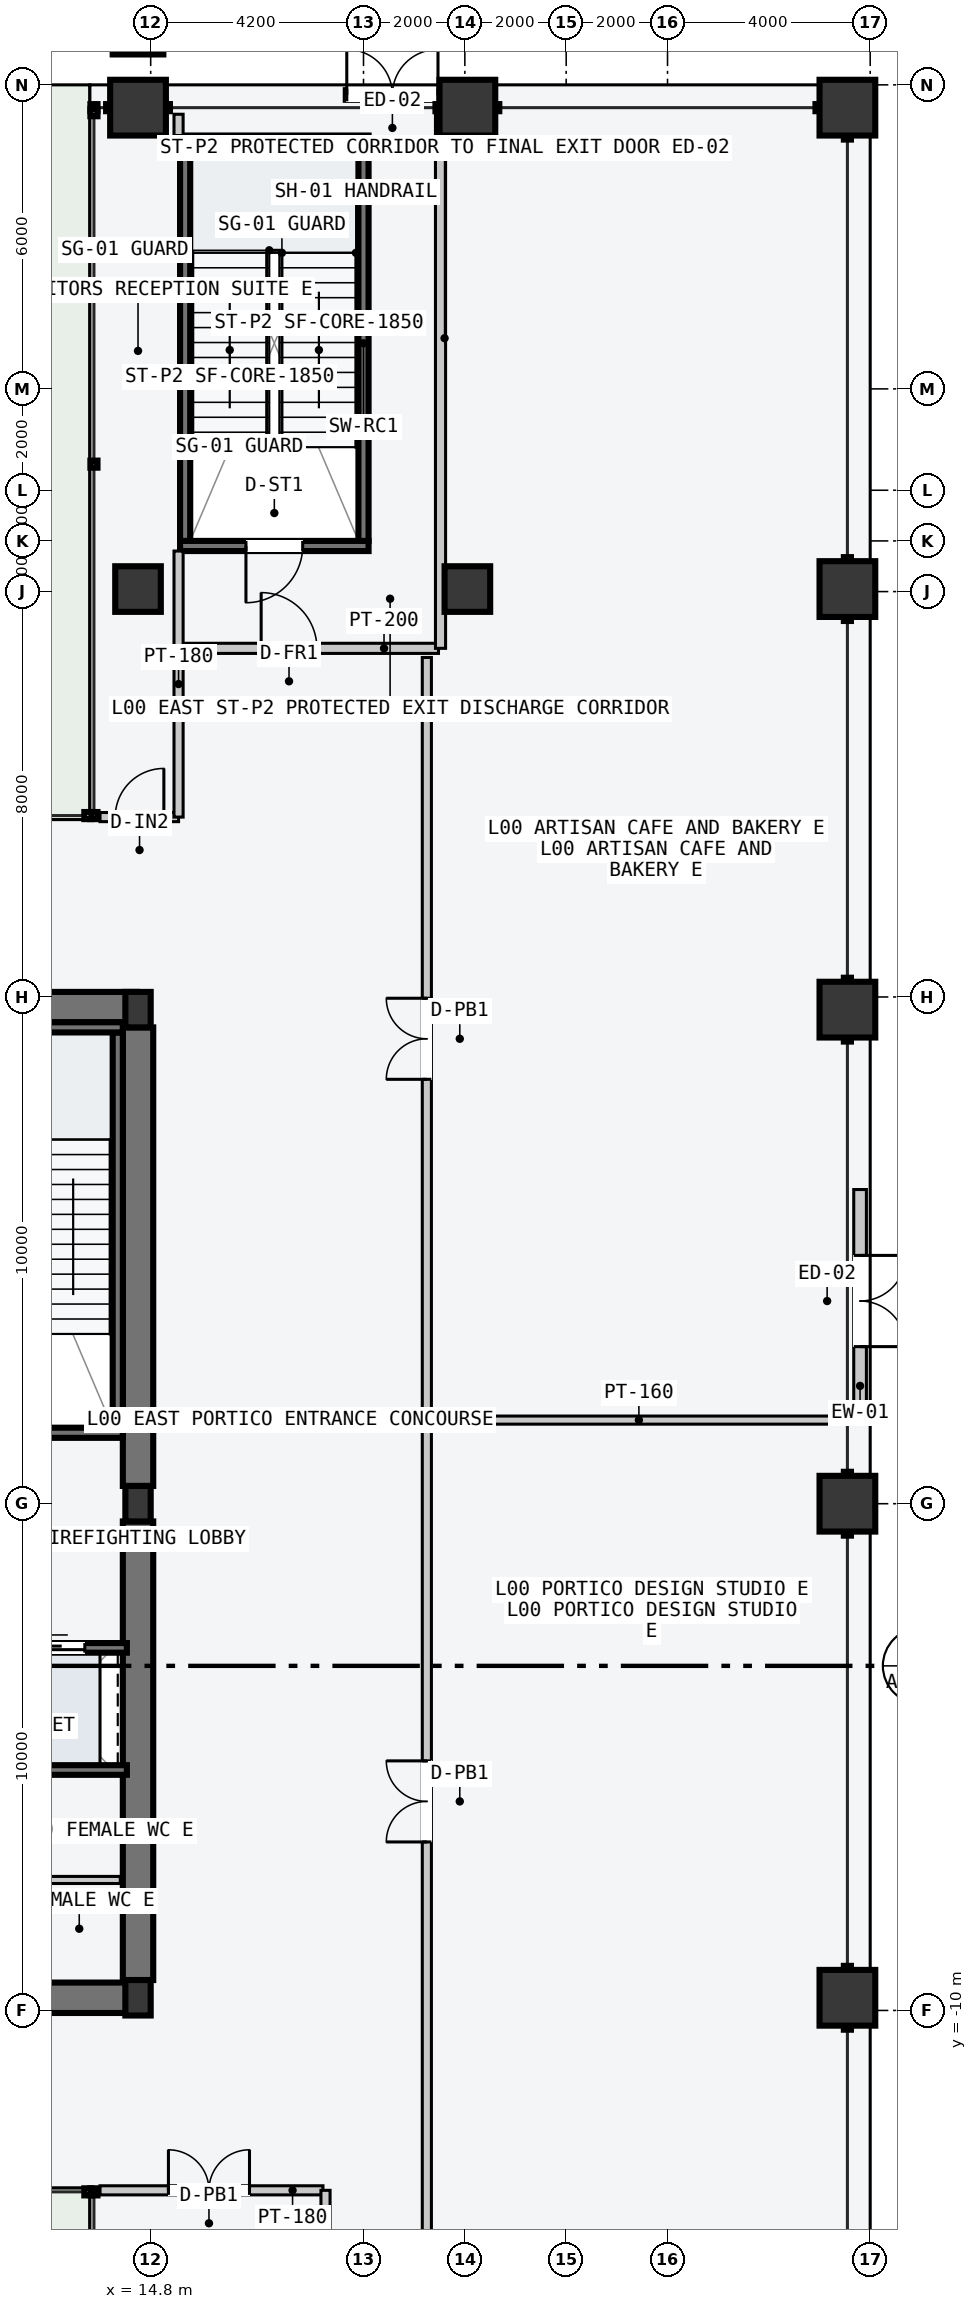
"""IFC4 building model, lengths in metres.
Left out: names, types, materials, properties, quantities, classifications, styles, units other than length and angle.
Written with IfcOpenShell. Run it as: python <this file> out.ifc"""

import sys

from ifc_helpers import new_model, si_unit, direction, frame, frame_2d, origin, origin_2d, place, context, subcontext, project, spatial, rectangle, hollow_rectangle, i_section, extrude, element, fill, save


model = new_model("IFC4")
c1 = context("Model", 3, precision=1e-05, world=origin(), true_north=direction((0.0, 1.0)))
c2 = subcontext(c1, "Body", "Model", "MODEL_VIEW")
j1 = project(units=[si_unit("LENGTHUNIT", "METRE"), si_unit("PLANEANGLEUNIT", "RADIAN")], contexts=[c1])
p1 = place(None, origin())
s1 = spatial("IfcSite", under=j1, at=p1, CompositionType="ELEMENT")
p2 = place(p1, origin())
s2 = spatial("IfcBuilding", under=s1, at=p2, CompositionType="ELEMENT")
p3 = place(p2, origin())
s3 = spatial("IfcBuildingStorey", under=s2, at=p3, CompositionType="ELEMENT", Elevation=0.0)
for number, where, z_axis, x_axis in (
    (1, (8.07, -9.75, -0.22), (0.0, 0.0, 1.0), (1.0, 0.0, 0.0)),
    (2, (8.07, 9.8, -0.22), (0.0, 0.0, 1.0), (1.0, 0.0, 0.0)),
):
    element("IfcWall", number, at=place(p3, frame(where, z_axis=z_axis, x_axis=x_axis)), inside=s3, PredefinedType="SHEAR", context=c2, shape_type="SweptSolid", body=[
        extrude(rectangle(XDim=6.46, YDim=0.6, at=frame_2d((3.23, 0.0))), origin(), (0.0, 0.0, 1.0), 4.8),
    ])
for number, where, z_axis, x_axis in (
    (3, (14.55, -9.4, -0.22), (0.0, 0.0, 1.0), (0.0, 1.0, 0.0)),
    (4, (14.55, 0.35, -0.22), (0.0, 0.0, 1.0), (0.0, 1.0, 0.0)),
):
    element("IfcWall", number, at=place(p3, frame(where, z_axis=z_axis, x_axis=x_axis)), inside=s3, PredefinedType="SHEAR", context=c2, shape_type="SweptSolid", body=[
        extrude(rectangle(XDim=9.05, YDim=0.6, at=frame_2d((4.525, 0.0))), origin(), (0.0, 0.0, 1.0), 4.8),
    ])
p4 = place(p3, frame((14.15, 1.5, -0.22), z_axis=(0.0, 0.0, 1.0), x_axis=(0.0, 1.0, 0.0)))
e5 = element("IfcWall", 5, at=p4, inside=s3, PredefinedType="SOLIDWALL", context=c2, shape_type="SweptSolid", body=[
    extrude(rectangle(XDim=7.8, YDim=0.2, at=frame_2d((3.9, 0.0))), origin(), (0.0, 0.0, 1.0), 4.8),
])
p5 = place(p3, frame((14.25, 1.4, -0.22), z_axis=(0.0, 0.0, 1.0), x_axis=(-1.0, 0.0, 0.0)))
e6 = element("IfcWall", 6, at=p5, inside=s3, PredefinedType="SOLIDWALL", context=c2, shape_type="SweptSolid", body=[
    extrude(rectangle(XDim=4.1, YDim=0.2, at=frame_2d((2.05, 0.0))), origin(), (0.0, 0.0, 1.0), 4.8),
])
p6 = place(p5, frame((1.5, 0.0, 0.22)))
e7 = element("IfcOpeningElement", 7, at=p6, cuts=e6, PredefinedType="OPENING", context=c2, shape_type="SweptSolid", body=[
    extrude(rectangle(XDim=1.12, YDim=2.18, at=frame_2d((0.56, 1.09))), frame((0.0, 0.11, 0.0), z_axis=(0.0, -1.0, 0.0), x_axis=(1.0, 0.0, 0.0)), (0.0, 0.0, 1.0), 0.22),
])
p7 = place(p3, frame((10.15, 9.4, -0.22), z_axis=(0.0, 0.0, 1.0), x_axis=(1.0, 0.0, 0.0)))
e8 = element("IfcWall", 8, at=p7, inside=s3, PredefinedType="SOLIDWALL", context=c2, shape_type="SweptSolid", body=[
    extrude(rectangle(XDim=4.1, YDim=0.2, at=frame_2d((2.05, 0.0))), origin(), (0.0, 0.0, 1.0), 4.8),
])
p8 = place(p3, frame((19.1, 18.9, -0.22), z_axis=(0.0, 0.0, 1.0), x_axis=(-1.0, 0.0, 0.0)))
e9 = element("IfcWall", 9, at=p8, inside=s3, PredefinedType="SOLIDWALL", context=c2, shape_type="SweptSolid", body=[
    extrude(rectangle(XDim=3.72, YDim=0.2, at=frame_2d((1.86, 0.0))), origin(), (0.0, 0.0, 1.0), 4.8),
])
p9 = place(p8, frame((1.3, 0.0, 0.22)))
e10 = element("IfcOpeningElement", 10, at=p9, cuts=e9, PredefinedType="OPENING", context=c2, shape_type="SweptSolid", body=[
    extrude(rectangle(XDim=1.12, YDim=2.18, at=frame_2d((0.56, 1.09))), frame((0.0, 0.11, 0.0), z_axis=(0.0, -1.0, 0.0), x_axis=(1.0, 0.0, 0.0)), (0.0, 0.0, 1.0), 0.22),
])
p10 = place(p3, frame((15.38, 26.9, -0.22), z_axis=(0.0, 0.0, 1.0), x_axis=(1.0, 0.0, 0.0)))
e11 = element("IfcWall", 11, at=p10, inside=s3, PredefinedType="SOLIDWALL", context=c2, shape_type="SweptSolid", body=[
    extrude(rectangle(XDim=3.72, YDim=0.2, at=frame_2d((1.86, 0.0))), origin(), (0.0, 0.0, 1.0), 4.8),
])
for number, where, z_axis, x_axis in (
    (12, (15.48, 19.0, -0.22), (0.0, 0.0, 1.0), (0.0, 1.0, 0.0)),
    (13, (19.0, 19.0, -0.22), (0.0, 0.0, 1.0), (0.0, 1.0, 0.0)),
):
    element("IfcWall", number, at=place(p3, frame(where, z_axis=z_axis, x_axis=x_axis)), inside=s3, PredefinedType="SOLIDWALL", context=c2, shape_type="SweptSolid", body=[
        extrude(rectangle(XDim=7.8, YDim=0.2, at=frame_2d((3.9, 0.0))), origin(), (0.0, 0.0, 1.0), 4.8),
    ])
for number, where, z_axis, x_axis in (
    (14, (14.55, -9.75, 0.0), (0.0, 0.0, 1.0), (1.0, 0.0, 0.0)),
    (15, (14.55, 0.0, 0.0), (0.0, 0.0, 1.0), (1.0, 0.0, 0.0)),
    (16, (14.55, 9.75, 0.0), (0.0, 0.0, 1.0), (1.0, 0.0, 0.0)),
):
    element("IfcColumn", number, at=place(p3, frame(where, z_axis=z_axis, x_axis=x_axis)), inside=s3, PredefinedType="COLUMN", context=c2, shape_type="SweptSolid", body=[
        extrude(i_section(OverallWidth=0.5, OverallDepth=0.7, WebThickness=0.028, FlangeThickness=0.045, at=origin_2d()), origin(), (0.0, 0.0, 1.0), 4.8),
    ])
for number, where, z_axis, x_axis in (
    (17, (14.55, 18.05, 0.0), (0.0, 0.0, 1.0), (1.0, 0.0, 0.0)),
    (18, (21.05, 18.05, 0.0), (0.0, 0.0, 1.0), (1.0, 0.0, 0.0)),
):
    element("IfcColumn", number, at=place(p3, frame(where, z_axis=z_axis, x_axis=x_axis)), inside=s3, PredefinedType="COLUMN", context=c2, shape_type="SweptSolid", body=[
        extrude(hollow_rectangle(XDim=0.9, YDim=0.9, WallThickness=0.045, at=origin_2d()), origin(), (0.0, 0.0, 1.0), 4.8),
    ])
for number, where, z_axis, x_axis in (
    (19, (14.55, 27.55, 0.0), (0.0, 0.0, 1.0), (1.0, 0.0, 0.0)),
    (20, (21.05, 27.55, 0.0), (0.0, 0.0, 1.0), (1.0, 0.0, 0.0)),
    (21, (28.55, 27.55, 0.0), (0.0, 0.0, 1.0), (1.0, 0.0, 0.0)),
    (22, (28.55, -9.75, 0.0), (0.0, 0.0, 1.0), (0.0, 1.0, 0.0)),
    (23, (28.55, 0.0, 0.0), (0.0, 0.0, 1.0), (0.0, 1.0, 0.0)),
    (24, (28.55, 9.75, 0.0), (0.0, 0.0, 1.0), (0.0, 1.0, 0.0)),
    (25, (28.55, 18.05, 0.0), (0.0, 0.0, 1.0), (0.0, 1.0, 0.0)),
):
    element("IfcColumn", number, at=place(p3, frame(where, z_axis=z_axis, x_axis=x_axis)), inside=s3, PredefinedType="COLUMN", context=c2, shape_type="SweptSolid", body=[
        extrude(hollow_rectangle(XDim=1.1, YDim=1.1, WallThickness=0.055, at=origin_2d()), origin(), (0.0, 0.0, 1.0), 4.8),
    ])
p11 = place(p3, frame((14.55, 29.1, -0.22), z_axis=(0.0, 0.0, 1.0), x_axis=(1.0, 0.0, 0.0)))
e26 = element("IfcColumn", 26, at=p11, inside=s3, PredefinedType="COLUMN", context=c2, shape_type="SweptSolid", body=[
    extrude(hollow_rectangle(XDim=1.0, YDim=1.0, WallThickness=0.05, at=origin_2d()), origin(), (0.0, 0.0, 1.0), 5.02),
])
p12 = place(p3, frame((11.65, -2.845, -0.22), z_axis=(0.0, 0.0, 1.0), x_axis=(1.0, 0.0, 0.0)))
e27 = element("IfcWall", 27, at=p12, inside=s3, PredefinedType="SOLIDWALL", context=c2, shape_type="SweptSolid", body=[
    extrude(rectangle(XDim=2.68, YDim=0.19, at=frame_2d((1.34, 0.0))), origin(), (0.0, 0.0, 1.0), 4.8),
])
p13 = place(p12, frame((0.65, 0.0, 0.22)))
e28 = element("IfcOpeningElement", 28, at=p13, cuts=e27, PredefinedType="OPENING", context=c2, shape_type="SweptSolid", body=[
    extrude(rectangle(XDim=1.2, YDim=2.2, at=frame_2d((0.6, 1.1))), frame((0.0, 0.105, 0.0), z_axis=(0.0, -1.0, 0.0), x_axis=(1.0, 0.0, 0.0)), (0.0, 0.0, 1.0), 0.21),
])
p14 = place(p3, frame((11.65, -5.255, -0.22), z_axis=(0.0, 0.0, 1.0), x_axis=(1.0, 0.0, 0.0)))
e29 = element("IfcWall", 29, at=p14, inside=s3, PredefinedType="SOLIDWALL", context=c2, shape_type="SweptSolid", body=[
    extrude(rectangle(XDim=2.68, YDim=0.19, at=frame_2d((1.34, 0.0))), origin(), (0.0, 0.0, 1.0), 4.8),
])
p15 = place(p3, frame((11.7, -7.425, 0.0), z_axis=(0.0, 0.0, 1.0), x_axis=(1.0, 0.0, 0.0)))
e30 = element("IfcWall", 30, at=p15, inside=s3, PredefinedType="PARTITIONING", context=c2, shape_type="SweptSolid", body=[
    extrude(rectangle(XDim=2.5, YDim=0.14, at=frame_2d((1.25, 0.0))), origin(), (0.0, 0.0, 1.0), 4.58),
])
p16 = place(p3, frame((15.38, 16.88, 0.0), z_axis=(0.0, 0.0, 1.0), x_axis=(1.0, 0.0, 0.0)))
e31 = element("IfcWall", 31, at=p16, inside=s3, PredefinedType="PARTITIONING", context=c2, shape_type="SweptSolid", body=[
    extrude(rectangle(XDim=5.1, YDim=0.2, at=frame_2d((2.55, 0.0))), origin(), (0.0, 0.0, 1.0), 4.58),
])
p17 = place(p16, frame((1.6, 0.0, 0.0)))
e32 = element("IfcOpeningElement", 32, at=p17, cuts=e31, PredefinedType="OPENING", context=c2, shape_type="SweptSolid", body=[
    extrude(rectangle(XDim=1.1, YDim=2.15, at=frame_2d((0.55, 1.075))), frame((0.0, 0.11, 0.0), z_axis=(0.0, -1.0, 0.0), x_axis=(1.0, 0.0, 0.0)), (0.0, 0.0, 1.0), 0.22),
])
p18 = place(p3, frame((20.52, 16.88, 0.0), z_axis=(0.0, 0.0, 1.0), x_axis=(0.0, 1.0, 0.0)))
e33 = element("IfcWall", 33, at=p18, inside=s3, PredefinedType="PARTITIONING", context=c2, shape_type="SweptSolid", body=[
    extrude(rectangle(XDim=10.77, YDim=0.2, at=frame_2d((5.385, 0.0))), origin(), (0.0, 0.0, 1.0), 4.58),
])
p19 = place(p3, frame((20.35, 1.65, 0.0), z_axis=(0.0, 0.0, 1.0), x_axis=(1.0, 0.0, 0.0)))
e34 = element("IfcWall", 34, at=p19, inside=s3, PredefinedType="PARTITIONING", context=c2, shape_type="SweptSolid", body=[
    extrude(rectangle(XDim=8.17, YDim=0.16, at=frame_2d((4.085, 0.0))), origin(), (0.0, 0.0, 1.0), 4.58),
])
p20 = place(p3, frame((20.25, -20.6, 0.0), z_axis=(0.0, 0.0, 1.0), x_axis=(0.0, 1.0, 0.0)))
e35 = element("IfcWall", 35, at=p20, inside=s3, PredefinedType="PARTITIONING", context=c2, shape_type="SweptSolid", body=[
    extrude(rectangle(XDim=37.3, YDim=0.18, at=frame_2d((18.65, 0.0))), origin(), (0.0, 0.0, 1.0), 4.58),
])
p21 = place(p20, frame((13.925, 0.0, 0.0)))
e36 = element("IfcOpeningElement", 36, at=p21, cuts=e35, PredefinedType="OPENING", context=c2, shape_type="SweptSolid", body=[
    extrude(rectangle(XDim=1.6, YDim=2.3, at=frame_2d((0.8, 1.15))), frame((0.0, 0.1, 0.0), z_axis=(0.0, -1.0, 0.0), x_axis=(1.0, 0.0, 0.0)), (0.0, 0.0, 1.0), 0.2),
])
p22 = place(p20, frame((28.975, 0.0, 0.0)))
e37 = element("IfcOpeningElement", 37, at=p22, cuts=e35, PredefinedType="OPENING", context=c2, shape_type="SweptSolid", body=[
    extrude(rectangle(XDim=1.6, YDim=2.3, at=frame_2d((0.8, 1.15))), frame((0.0, 0.1, 0.0), z_axis=(0.0, -1.0, 0.0), x_axis=(1.0, 0.0, 0.0)), (0.0, 0.0, 1.0), 0.2),
])
p23 = place(p3, frame((13.8, -13.55, 0.0), z_axis=(0.0, 0.0, 1.0), x_axis=(1.0, 0.0, 0.0)))
e38 = element("IfcWall", 38, at=p23, inside=s3, PredefinedType="PARTITIONING", context=c2, shape_type="SweptSolid", body=[
    extrude(rectangle(XDim=4.4, YDim=0.18, at=frame_2d((2.2, 0.0))), origin(), (0.0, 0.0, 1.0), 4.58),
])
p24 = place(p23, frame((1.35, 0.0, 0.0)))
e39 = element("IfcOpeningElement", 39, at=p24, cuts=e38, PredefinedType="OPENING", context=c2, shape_type="SweptSolid", body=[
    extrude(rectangle(XDim=1.6, YDim=2.3, at=frame_2d((0.8, 1.15))), frame((0.0, 0.1, 0.0), z_axis=(0.0, -1.0, 0.0), x_axis=(1.0, 0.0, 0.0)), (0.0, 0.0, 1.0), 0.2),
])
p25 = place(p3, frame((18.25, -27.5, 0.0), z_axis=(0.0, 0.0, 1.0), x_axis=(0.0, 1.0, 0.0)))
e40 = element("IfcWall", 40, at=p25, inside=s3, PredefinedType="PARTITIONING", context=c2, shape_type="SweptSolid", body=[
    extrude(rectangle(XDim=13.95, YDim=0.18, at=frame_2d((6.975, 0.0))), origin(), (0.0, 0.0, 1.0), 4.58),
])
p26 = place(p3, frame((13.8, 13.55, 0.0), z_axis=(0.0, 0.0, 1.0), x_axis=(1.0, 0.0, 0.0)))
e41 = element("IfcWall", 41, at=p26, inside=s3, PredefinedType="PARTITIONING", context=c2, shape_type="SweptSolid", body=[
    extrude(rectangle(XDim=1.55, YDim=0.18, at=frame_2d((0.775, 0.0))), origin(), (0.0, 0.0, 1.0), 4.58),
])
p27 = place(p26, frame((0.3, 0.0, 0.0)))
e42 = element("IfcOpeningElement", 42, at=p27, cuts=e41, PredefinedType="OPENING", context=c2, shape_type="SweptSolid", body=[
    extrude(rectangle(XDim=0.96, YDim=2.18, at=frame_2d((0.48, 1.09))), frame((0.0, 0.1, 0.0), z_axis=(0.0, -1.0, 0.0), x_axis=(1.0, 0.0, 0.0)), (0.0, 0.0, 1.0), 0.2),
])
p28 = place(p3, frame((15.35, 13.55, 0.0), z_axis=(0.0, 0.0, 1.0), x_axis=(0.0, 1.0, 0.0)))
e43 = element("IfcWall", 43, at=p28, inside=s3, PredefinedType="PARTITIONING", context=c2, shape_type="SweptSolid", body=[
    extrude(rectangle(XDim=5.25, YDim=0.18, at=frame_2d((2.625, 0.0))), origin(), (0.0, 0.0, 1.0), 4.58),
])
p29 = place(p3, frame((15.35, 27.0, 0.0), z_axis=(0.0, 0.0, 1.0), x_axis=(0.0, 1.0, 0.0)))
e44 = element("IfcWall", 44, at=p29, inside=s3, PredefinedType="PARTITIONING", context=c2, shape_type="SweptSolid", body=[
    extrude(rectangle(XDim=0.42, YDim=0.18, at=frame_2d((0.21, 0.0))), origin(), (0.0, 0.0, 1.0), 4.58),
])
p30 = place(p3, frame((18.62, 27.8, 0.0), z_axis=(0.0, 0.0, 1.0), x_axis=(1.0, 0.0, 0.0)))
e45 = element("IfcWall", 45, at=p30, inside=s3, PredefinedType="STANDARD", context=c2, shape_type="SweptSolid", body=[
    extrude(rectangle(XDim=1.9, YDim=0.25, at=frame_2d((0.95, 0.0))), origin(), (0.0, 0.0, 1.0), 4.58),
])
p31 = place(p30, frame((0.05, 0.0, 0.0)))
e46 = element("IfcOpeningElement", 46, at=p31, cuts=e45, PredefinedType="OPENING", context=c2, shape_type="SweptSolid", body=[
    extrude(rectangle(XDim=1.8, YDim=2.4, at=frame_2d((0.9, 1.2))), frame((0.0, 0.135, 0.0), z_axis=(0.0, -1.0, 0.0), x_axis=(1.0, 0.0, 0.0)), (0.0, 0.0, 1.0), 0.27),
])
p32 = place(p3, frame((28.8, 6.2, 0.0), z_axis=(0.0, 0.0, 1.0), x_axis=(0.0, -1.0, 0.0)))
e47 = element("IfcWall", 47, at=p32, inside=s3, PredefinedType="STANDARD", context=c2, shape_type="SweptSolid", body=[
    extrude(rectangle(XDim=4.4, YDim=0.25, at=frame_2d((2.2, 0.0))), origin(), (0.0, 0.0, 1.0), 4.58),
])
p33 = place(p32, frame((1.3, 0.0, 0.0)))
e48 = element("IfcOpeningElement", 48, at=p33, cuts=e47, PredefinedType="OPENING", context=c2, shape_type="SweptSolid", body=[
    extrude(rectangle(XDim=1.8, YDim=2.4, at=frame_2d((0.9, 1.2))), frame((0.0, 0.135, 0.0), z_axis=(0.0, -1.0, 0.0), x_axis=(1.0, 0.0, 0.0)), (0.0, 0.0, 1.0), 0.27),
])
p34 = place(p9, origin())
e49 = element("IfcDoor", 49, at=p34, inside=s3, OperationType="SINGLE_SWING_RIGHT", PredefinedType="DOOR", context=c2, shape_type="SweptSolid", body=[
    extrude(rectangle(XDim=1.12, YDim=2.18, at=frame_2d((0.56, 1.09))), frame((0.0, 0.025, 0.0), z_axis=(0.0, -1.0, 0.0), x_axis=(1.0, 0.0, 0.0)), (0.0, 0.0, 1.0), 0.05),
])
fill(e10, e49)
p35 = place(p13, origin())
e50 = element("IfcDoor", 50, at=p35, inside=s3, OperationType="SLIDING_TO_LEFT", PredefinedType="DOOR", context=c2, shape_type="SweptSolid", body=[
    extrude(rectangle(XDim=1.2, YDim=2.2, at=frame_2d((0.6, 1.1))), frame((0.0, 0.025, 0.0), z_axis=(0.0, -1.0, 0.0), x_axis=(1.0, 0.0, 0.0)), (0.0, 0.0, 1.0), 0.05),
])
fill(e28, e50)
p36 = place(p17, origin())
e51 = element("IfcDoor", 51, at=p36, inside=s3, OperationType="SINGLE_SWING_LEFT", PredefinedType="DOOR", context=c2, shape_type="SweptSolid", body=[
    extrude(rectangle(XDim=1.1, YDim=2.15, at=frame_2d((0.55, 1.075))), frame((0.0, 0.025, 0.0), z_axis=(0.0, -1.0, 0.0), x_axis=(1.0, 0.0, 0.0)), (0.0, 0.0, 1.0), 0.05),
])
fill(e32, e51)
p37 = place(p21, origin())
e52 = element("IfcDoor", 52, at=p37, inside=s3, OperationType="DOUBLE_DOOR_SINGLE_SWING", PredefinedType="DOOR", context=c2, shape_type="SweptSolid", body=[
    extrude(rectangle(XDim=1.6, YDim=2.3, at=frame_2d((0.8, 1.15))), frame((0.0, 0.025, 0.0), z_axis=(0.0, -1.0, 0.0), x_axis=(1.0, 0.0, 0.0)), (0.0, 0.0, 1.0), 0.05),
])
fill(e36, e52)
p38 = place(p22, origin())
e53 = element("IfcDoor", 53, at=p38, inside=s3, OperationType="DOUBLE_DOOR_SINGLE_SWING", PredefinedType="DOOR", context=c2, shape_type="SweptSolid", body=[
    extrude(rectangle(XDim=1.6, YDim=2.3, at=frame_2d((0.8, 1.15))), frame((0.0, 0.025, 0.0), z_axis=(0.0, -1.0, 0.0), x_axis=(1.0, 0.0, 0.0)), (0.0, 0.0, 1.0), 0.05),
])
fill(e37, e53)
p39 = place(p24, origin())
e54 = element("IfcDoor", 54, at=p39, inside=s3, OperationType="DOUBLE_DOOR_SINGLE_SWING", PredefinedType="DOOR", context=c2, shape_type="SweptSolid", body=[
    extrude(rectangle(XDim=1.6, YDim=2.3, at=frame_2d((0.8, 1.15))), frame((0.0, 0.025, 0.0), z_axis=(0.0, -1.0, 0.0), x_axis=(1.0, 0.0, 0.0)), (0.0, 0.0, 1.0), 0.05),
])
fill(e39, e54)
p40 = place(p27, origin())
e55 = element("IfcDoor", 55, at=p40, inside=s3, OperationType="SINGLE_SWING_RIGHT", PredefinedType="DOOR", context=c2, shape_type="SweptSolid", body=[
    extrude(rectangle(XDim=0.96, YDim=2.18, at=frame_2d((0.48, 1.09))), frame((0.0, 0.025, 0.0), z_axis=(0.0, -1.0, 0.0), x_axis=(1.0, 0.0, 0.0)), (0.0, 0.0, 1.0), 0.05),
])
fill(e42, e55)
p41 = place(p31, origin())
e56 = element("IfcDoor", 56, at=p41, inside=s3, OperationType="DOUBLE_DOOR_SINGLE_SWING", PredefinedType="DOOR", context=c2, shape_type="SweptSolid", body=[
    extrude(rectangle(XDim=1.8, YDim=2.4, at=frame_2d((0.9, 1.2))), frame((0.0, 0.025, 0.0), z_axis=(0.0, -1.0, 0.0), x_axis=(1.0, 0.0, 0.0)), (0.0, 0.0, 1.0), 0.05),
])
fill(e46, e56)
p42 = place(p33, origin())
e57 = element("IfcDoor", 57, at=p42, inside=s3, OperationType="DOUBLE_DOOR_SINGLE_SWING", PredefinedType="DOOR", context=c2, shape_type="SweptSolid", body=[
    extrude(rectangle(XDim=1.8, YDim=2.4, at=frame_2d((0.9, 1.2))), frame((0.0, 0.025, 0.0), z_axis=(0.0, -1.0, 0.0), x_axis=(1.0, 0.0, 0.0)), (0.0, 0.0, 1.0), 0.05),
])
fill(e48, e57)
save(model, sys.argv[1])
